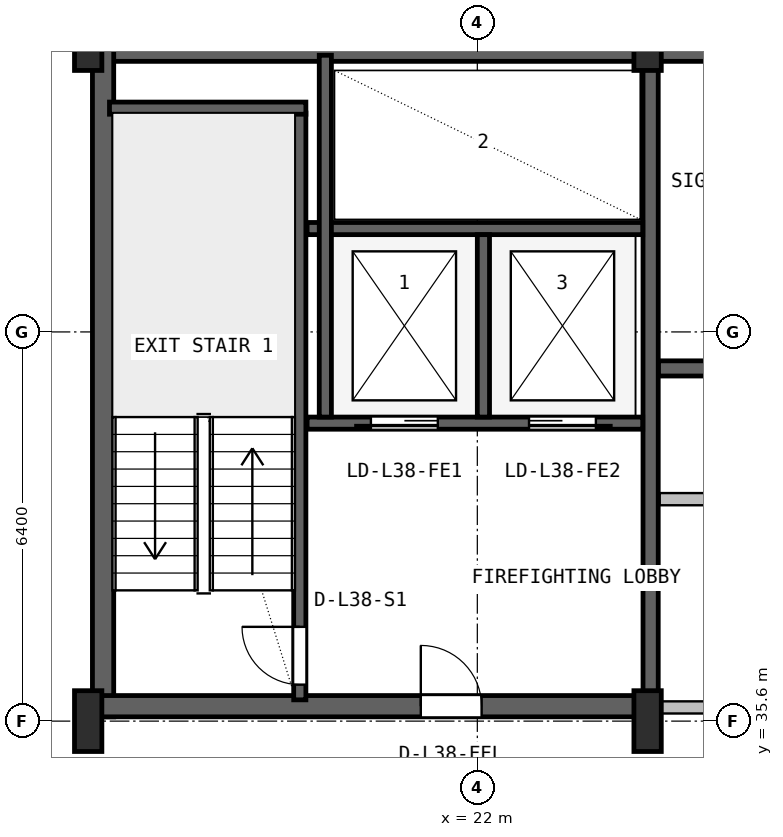
"""IFC4 building model, lengths in metres.
Left out: names, types, materials, properties, quantities, classifications, styles, units other than length and angle.
Written with IfcOpenShell. Run it as: python <this file> out.ifc"""

import sys

from ifc_helpers import new_model, si_unit, direction, frame, frame_2d, origin, origin_2d, place, context, subcontext, project, spatial, rectangle, i_section, extrude, source, transform, mapped, element, fill, save


model = new_model("IFC4")
c1 = context("Model", 3, precision=1e-05, world=origin(), true_north=direction((0.0, 1.0)))
c2 = subcontext(c1, "Body", "Model", "MODEL_VIEW")
j1 = project(units=[si_unit("LENGTHUNIT", "METRE"), si_unit("PLANEANGLEUNIT", "RADIAN")], contexts=[c1])
p1 = place(None, origin())
s1 = spatial("IfcSite", under=j1, at=p1, CompositionType="ELEMENT")
p2 = place(p1, origin())
s2 = spatial("IfcBuilding", under=s1, at=p2, CompositionType="ELEMENT")
p3 = place(p2, frame((0.0, 0.0, 157.2)))
s3 = spatial("IfcBuildingStorey", under=s2, at=p3, CompositionType="ELEMENT", Elevation=157.2)
p4 = place(p3, frame((15.6, 46.625, 0.0), z_axis=(0.0, 0.0, 1.0), x_axis=(1.0, 0.0, 0.0)))
e1 = element("IfcWall", 1, at=p4, inside=s3, PredefinedType="SHEAR", context=c2, shape_type="SweptSolid", body=[
    extrude(rectangle(XDim=36.8, YDim=0.35, at=frame_2d((18.4, 0.0))), origin(), (0.0, 0.0, 1.0), 3.55),
])
p5 = place(p3, frame((15.845, 35.67, 0.0), z_axis=(0.0, 0.0, 1.0), x_axis=(0.0, 1.0, 0.0)))
e2 = element("IfcWall", 2, at=p5, inside=s3, PredefinedType="SHEAR", context=c2, shape_type="SweptSolid", body=[
    extrude(rectangle(XDim=11.13, YDim=0.35, at=frame_2d((5.565, 0.0))), origin(), (0.0, 0.0, 1.0), 3.55),
])
p6 = place(p3, frame((15.67, 35.845, 0.0), z_axis=(0.0, 0.0, 1.0), x_axis=(1.0, 0.0, 0.0)))
e3 = element("IfcWall", 3, at=p6, inside=s3, PredefinedType="SHEAR", context=c2, shape_type="SweptSolid", body=[
    extrude(rectangle(XDim=9.13, YDim=0.35, at=frame_2d((4.565, 0.0))), origin(), (0.0, 0.0, 1.0), 3.55),
])
p7 = place(p6, frame((5.4, 0.0, 0.0)))
e4 = element("IfcOpeningElement", 4, at=p7, cuts=e3, PredefinedType="OPENING", context=c2, shape_type="SweptSolid", body=[
    extrude(rectangle(XDim=1.0, YDim=2.1, at=frame_2d((0.5, 1.05))), frame((0.0, 0.185, 0.0), z_axis=(0.0, -1.0, 0.0), x_axis=(1.0, 0.0, 0.0)), (0.0, 0.0, 1.0), 0.37),
])
m1 = source(origin(), c2, "Body", "SweptSolid", [
    extrude(i_section(OverallWidth=0.45, OverallDepth=1.0, WebThickness=0.016, FlangeThickness=0.03, FilletRadius=0.016, at=origin_2d()), origin(), (0.0, 0.0, 1.0), 3.8),
])
for number, where, z_axis, x_axis in (
    (5, (15.6, 35.6, 0.0), (0.0, 0.0, 1.0), (1.0, 0.0, 0.0)),
    (6, (15.6, 46.8, 0.0), (0.0, 0.0, 1.0), (1.0, 0.0, 0.0)),
    (7, (24.8, 35.6, 0.0), (0.0, 0.0, 1.0), (1.0, 0.0, 0.0)),
    (8, (24.8, 46.8, 0.0), (0.0, 0.0, 1.0), (1.0, 0.0, 0.0)),
):
    element("IfcColumn", number, at=place(p3, frame(where, z_axis=z_axis, x_axis=x_axis)), inside=s3, PredefinedType="COLUMN", context=c2, shape_type="MappedRepresentation", body=[
        mapped(m1, transform((0.0, 0.0, 0.0), x_axis=(1.0, 0.0, 0.0), y_axis=(0.0, 1.0, 0.0), z_axis=(0.0, 0.0, 1.0), scale=1.0)),
    ])
p8 = place(p3, frame((19.08, 35.95, 0.0), z_axis=(0.0, 0.0, 1.0), x_axis=(0.0, 1.0, 0.0)))
e9 = element("IfcWall", 9, at=p8, inside=s3, PredefinedType="SHEAR", context=c2, shape_type="SweptSolid", body=[
    extrude(rectangle(XDim=9.65, YDim=0.2, at=frame_2d((4.825, 0.0))), origin(), (0.0, 0.0, 1.0), 3.55),
])
p9 = place(p8, frame((0.25, 0.0, 0.0)))
e10 = element("IfcOpeningElement", 10, at=p9, cuts=e9, PredefinedType="OPENING", context=c2, shape_type="SweptSolid", body=[
    extrude(rectangle(XDim=0.95, YDim=2.1, at=frame_2d((0.475, 1.05))), frame((0.0, 0.11, 0.0), z_axis=(0.0, -1.0, 0.0), x_axis=(1.0, 0.0, 0.0)), (0.0, 0.0, 1.0), 0.22),
])
p10 = place(p3, frame((15.95, 45.68, 0.0), z_axis=(0.0, 0.0, 1.0), x_axis=(1.0, 0.0, 0.0)))
e11 = element("IfcWall", 11, at=p10, inside=s3, PredefinedType="SHEAR", context=c2, shape_type="SweptSolid", body=[
    extrude(rectangle(XDim=3.23, YDim=0.2, at=frame_2d((1.615, 0.0))), origin(), (0.0, 0.0, 1.0), 3.55),
])
p11 = place(p3, frame((24.85, 36.05, 0.0), z_axis=(0.0, 0.0, 1.0), x_axis=(0.0, 1.0, 0.0)))
e12 = element("IfcWall", 12, at=p11, inside=s3, PredefinedType="SHEAR", context=c2, shape_type="SweptSolid", body=[
    extrude(rectangle(XDim=10.45, YDim=0.25, at=frame_2d((5.225, 0.0))), origin(), (0.0, 0.0, 1.0), 3.55),
])
p12 = place(p3, frame((19.2, 40.5, 0.0), z_axis=(0.0, 0.0, 1.0), x_axis=(1.0, 0.0, 0.0)))
e13 = element("IfcWall", 13, at=p12, inside=s3, PredefinedType="SHEAR", context=c2, shape_type="SweptSolid", body=[
    extrude(rectangle(XDim=5.52, YDim=0.2, at=frame_2d((2.76, 0.0))), origin(), (0.0, 0.0, 1.0), 3.55),
])
p13 = place(p12, frame((1.05, 0.0, 0.0)))
e14 = element("IfcOpeningElement", 14, at=p13, cuts=e13, PredefinedType="OPENING", context=c2, shape_type="SweptSolid", body=[
    extrude(rectangle(XDim=1.1, YDim=2.18, at=frame_2d((0.55, 1.09))), frame((0.0, 0.11, 0.0), z_axis=(0.0, -1.0, 0.0), x_axis=(1.0, 0.0, 0.0)), (0.0, 0.0, 1.0), 0.22),
])
p14 = place(p12, frame((3.65, 0.0, 0.0)))
e15 = element("IfcOpeningElement", 15, at=p14, cuts=e13, PredefinedType="OPENING", context=c2, shape_type="SweptSolid", body=[
    extrude(rectangle(XDim=1.1, YDim=2.18, at=frame_2d((0.55, 1.09))), frame((0.0, 0.11, 0.0), z_axis=(0.0, -1.0, 0.0), x_axis=(1.0, 0.0, 0.0)), (0.0, 0.0, 1.0), 0.22),
])
p15 = place(p3, frame((19.2, 43.7, 0.0), z_axis=(0.0, 0.0, 1.0), x_axis=(1.0, 0.0, 0.0)))
e16 = element("IfcWall", 16, at=p15, inside=s3, PredefinedType="SHEAR", context=c2, shape_type="SweptSolid", body=[
    extrude(rectangle(XDim=5.52, YDim=0.2, at=frame_2d((2.76, 0.0))), origin(), (0.0, 0.0, 1.0), 3.55),
])
p16 = place(p3, frame((22.1, 40.6, 0.0), z_axis=(0.0, 0.0, 1.0), x_axis=(0.0, 1.0, 0.0)))
e17 = element("IfcWall", 17, at=p16, inside=s3, PredefinedType="SHEAR", context=c2, shape_type="SweptSolid", body=[
    extrude(rectangle(XDim=3.0, YDim=0.2, at=frame_2d((1.5, 0.0))), origin(), (0.0, 0.0, 1.0), 3.55),
])
p17 = place(p3, frame((19.5, 40.6, 0.0), z_axis=(0.0, 0.0, 1.0), x_axis=(0.0, 1.0, 0.0)))
e18 = element("IfcWall", 18, at=p17, inside=s3, PredefinedType="SHEAR", context=c2, shape_type="SweptSolid", body=[
    extrude(rectangle(XDim=5.95, YDim=0.2, at=frame_2d((2.975, 0.0))), origin(), (0.0, 0.0, 1.0), 3.55),
])
p18 = place(p3, frame((24.98, 41.4, 0.0), z_axis=(0.0, 0.0, 1.0), x_axis=(1.0, 0.0, 0.0)))
e19 = element("IfcWall", 19, at=p18, inside=s3, PredefinedType="SHEAR", context=c2, shape_type="SweptSolid", body=[
    extrude(rectangle(XDim=23.82, YDim=0.25, at=frame_2d((11.91, 0.0))), origin(), (0.0, 0.0, 1.0), 3.55),
])
p19 = place(p18, frame((8.87, 0.0, 0.0)))
e20 = element("IfcOpeningElement", 20, at=p19, cuts=e19, PredefinedType="OPENING", context=c2, shape_type="SweptSolid", body=[
    extrude(rectangle(XDim=1.1, YDim=2.18, at=frame_2d((0.55, 1.09))), frame((0.0, 0.135, 0.0), z_axis=(0.0, -1.0, 0.0), x_axis=(1.0, 0.0, 0.0)), (0.0, 0.0, 1.0), 0.27),
])
p20 = place(p18, frame((11.47, 0.0, 0.0)))
e21 = element("IfcOpeningElement", 21, at=p20, cuts=e19, PredefinedType="OPENING", context=c2, shape_type="SweptSolid", body=[
    extrude(rectangle(XDim=1.1, YDim=2.18, at=frame_2d((0.55, 1.09))), frame((0.0, 0.135, 0.0), z_axis=(0.0, -1.0, 0.0), x_axis=(1.0, 0.0, 0.0)), (0.0, 0.0, 1.0), 0.27),
])
p21 = place(p18, frame((14.07, 0.0, 0.0)))
e22 = element("IfcOpeningElement", 22, at=p21, cuts=e19, PredefinedType="OPENING", context=c2, shape_type="SweptSolid", body=[
    extrude(rectangle(XDim=1.1, YDim=2.18, at=frame_2d((0.55, 1.09))), frame((0.0, 0.135, 0.0), z_axis=(0.0, -1.0, 0.0), x_axis=(1.0, 0.0, 0.0)), (0.0, 0.0, 1.0), 0.27),
])
p22 = place(p18, frame((1.81, 0.0, 0.0)))
e23 = element("IfcOpeningElement", 23, at=p22, cuts=e19, PredefinedType="OPENING", context=c2, shape_type="SweptSolid", body=[
    extrude(rectangle(XDim=0.92, YDim=2.08, at=frame_2d((0.46, 1.04))), frame((0.0, 0.135, 0.0), z_axis=(0.0, -1.0, 0.0), x_axis=(1.0, 0.0, 0.0)), (0.0, 0.0, 1.0), 0.27),
])
p23 = place(p18, frame((5.71, 0.0, 0.0)))
e24 = element("IfcOpeningElement", 24, at=p23, cuts=e19, PredefinedType="OPENING", context=c2, shape_type="SweptSolid", body=[
    extrude(rectangle(XDim=0.92, YDim=2.08, at=frame_2d((0.46, 1.04))), frame((0.0, 0.135, 0.0), z_axis=(0.0, -1.0, 0.0), x_axis=(1.0, 0.0, 0.0)), (0.0, 0.0, 1.0), 0.27),
])
p24 = place(p3, frame((25.0, 35.825, 0.0), z_axis=(0.0, 0.0, 1.0), x_axis=(1.0, 0.0, 0.0)))
e25 = element("IfcWall", 25, at=p24, inside=s3, PredefinedType="SOLIDWALL", context=c2, shape_type="SweptSolid", body=[
    extrude(rectangle(XDim=12.95, YDim=0.2, at=frame_2d((6.475, 0.0))), origin(), (0.0, 0.0, 1.0), 2.575),
])
p25 = place(p3, frame((25.0, 39.25, 0.0), z_axis=(0.0, 0.0, 1.0), x_axis=(1.0, 0.0, 0.0)))
e26 = element("IfcWall", 26, at=p25, inside=s3, PredefinedType="SOLIDWALL", context=c2, shape_type="SweptSolid", body=[
    extrude(rectangle(XDim=12.95, YDim=0.2, at=frame_2d((6.475, 0.0))), origin(), (0.0, 0.0, 1.0), 3.53),
])
p26 = place(p25, frame((1.1, 0.0, 0.0)))
e27 = element("IfcOpeningElement", 27, at=p26, cuts=e26, PredefinedType="OPENING", context=c2, shape_type="SweptSolid", body=[
    extrude(rectangle(XDim=0.9, YDim=2.06, at=frame_2d((0.45, 1.03))), frame((0.0, 0.11, 0.0), z_axis=(0.0, -1.0, 0.0), x_axis=(1.0, 0.0, 0.0)), (0.0, 0.0, 1.0), 0.22),
])
p27 = place(p25, frame((4.5, 0.0, 0.0)))
e28 = element("IfcOpeningElement", 28, at=p27, cuts=e26, PredefinedType="OPENING", context=c2, shape_type="SweptSolid", body=[
    extrude(rectangle(XDim=0.9, YDim=2.06, at=frame_2d((0.45, 1.03))), frame((0.0, 0.11, 0.0), z_axis=(0.0, -1.0, 0.0), x_axis=(1.0, 0.0, 0.0)), (0.0, 0.0, 1.0), 0.22),
])
p28 = place(p25, frame((7.84, 0.0, 0.0)))
e29 = element("IfcOpeningElement", 29, at=p28, cuts=e26, PredefinedType="OPENING", context=c2, shape_type="SweptSolid", body=[
    extrude(rectangle(XDim=0.92, YDim=2.08, at=frame_2d((0.46, 1.04))), frame((0.0, 0.11, 0.0), z_axis=(0.0, -1.0, 0.0), x_axis=(1.0, 0.0, 0.0)), (0.0, 0.0, 1.0), 0.22),
])
p29 = place(p25, frame((10.875, 0.0, 0.0)))
e30 = element("IfcOpeningElement", 30, at=p29, cuts=e26, PredefinedType="OPENING", context=c2, shape_type="SweptSolid", body=[
    extrude(rectangle(XDim=1.2, YDim=2.1, at=frame_2d((0.6, 1.05))), frame((0.0, 0.11, 0.0), z_axis=(0.0, -1.0, 0.0), x_axis=(1.0, 0.0, 0.0)), (0.0, 0.0, 1.0), 0.22),
])
m2 = source(origin(), c2, "Body", "SweptSolid", [
    extrude(rectangle(XDim=0.95, YDim=2.1, at=frame_2d((0.475, 1.05))), frame((0.0, 0.025, 0.0), z_axis=(0.0, -1.0, 0.0), x_axis=(1.0, 0.0, 0.0)), (0.0, 0.0, 1.0), 0.05),
])
p30 = place(p9, origin())
e31 = element("IfcDoor", 31, at=p30, inside=s3, OperationType="SINGLE_SWING_RIGHT", PredefinedType="DOOR", context=c2, shape_type="MappedRepresentation", body=[
    mapped(m2, transform((0.0, 0.0, 0.0), x_axis=(1.0, 0.0, 0.0), y_axis=(0.0, 1.0, 0.0), z_axis=(0.0, 0.0, 1.0), scale=1.0)),
])
fill(e10, e31)
m3 = source(origin(), c2, "Body", "SweptSolid", [
    extrude(rectangle(XDim=1.0, YDim=2.1, at=frame_2d((0.5, 1.05))), frame((0.0, 0.025, 0.0), z_axis=(0.0, -1.0, 0.0), x_axis=(1.0, 0.0, 0.0)), (0.0, 0.0, 1.0), 0.05),
])
p31 = place(p7, origin())
e32 = element("IfcDoor", 32, at=p31, inside=s3, OperationType="SINGLE_SWING_LEFT", PredefinedType="DOOR", context=c2, shape_type="MappedRepresentation", body=[
    mapped(m3, transform((0.0, 0.0, 0.0), x_axis=(1.0, 0.0, 0.0), y_axis=(0.0, 1.0, 0.0), z_axis=(0.0, 0.0, 1.0), scale=1.0)),
])
fill(e4, e32)
m4 = source(origin(), c2, "Body", "SweptSolid", [
    extrude(rectangle(XDim=1.1, YDim=2.18, at=frame_2d((0.55, 1.09))), frame((0.0, 0.025, 0.0), z_axis=(0.0, -1.0, 0.0), x_axis=(1.0, 0.0, 0.0)), (0.0, 0.0, 1.0), 0.05),
])
p32 = place(p13, frame((1.1, 0.0, 0.0), z_axis=(0.0, 0.0, 1.0), x_axis=(-1.0, 0.0, 0.0)))
e33 = element("IfcDoor", 33, at=p32, inside=s3, OperationType="SLIDING_TO_LEFT", PredefinedType="DOOR", context=c2, shape_type="MappedRepresentation", body=[
    mapped(m4, transform((0.0, 0.0, 0.0), x_axis=(1.0, 0.0, 0.0), y_axis=(0.0, 1.0, 0.0), z_axis=(0.0, 0.0, 1.0), scale=1.0)),
])
fill(e14, e33)
p33 = place(p14, frame((1.1, 0.0, 0.0), z_axis=(0.0, 0.0, 1.0), x_axis=(-1.0, 0.0, 0.0)))
e34 = element("IfcDoor", 34, at=p33, inside=s3, OperationType="SLIDING_TO_RIGHT", PredefinedType="DOOR", context=c2, shape_type="MappedRepresentation", body=[
    mapped(m4, transform((0.0, 0.0, 0.0), x_axis=(1.0, 0.0, 0.0), y_axis=(0.0, 1.0, 0.0), z_axis=(0.0, 0.0, 1.0), scale=1.0)),
])
fill(e15, e34)
save(model, sys.argv[1])
